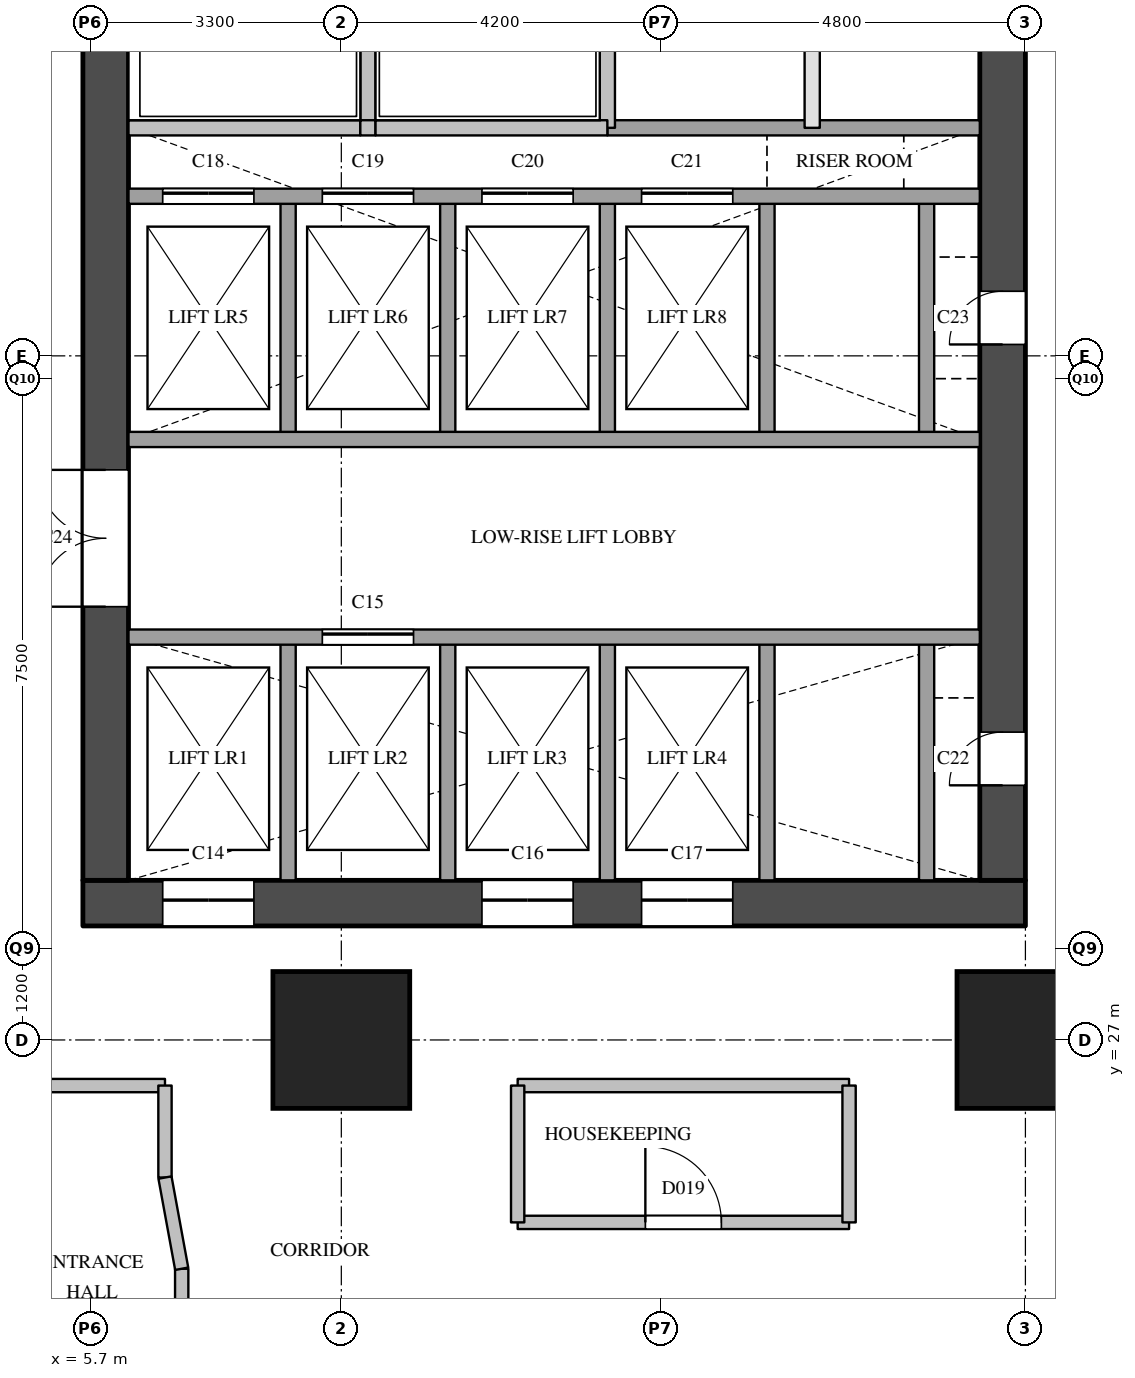
"""IFC4 building model, lengths in metres.
Left out: names, types, materials, properties, quantities, classifications, styles, units other than length and angle.
Written with IfcOpenShell. Run it as: python <this file> out.ifc"""

import sys

from ifc_helpers import new_model, si_unit, direction, frame, frame_2d, origin, origin_2d, place, context, subcontext, project, spatial, rectangle, extrude, element, fill, save


model = new_model("IFC4")
c1 = context("Model", 3, precision=1e-05, world=origin(), true_north=direction((0.0, 1.0)))
c2 = subcontext(c1, "Body", "Model", "MODEL_VIEW")
j1 = project(units=[si_unit("LENGTHUNIT", "METRE"), si_unit("PLANEANGLEUNIT", "RADIAN")], contexts=[c1])
p1 = place(None, origin())
s1 = spatial("IfcSite", under=j1, at=p1, CompositionType="ELEMENT")
p2 = place(p1, origin())
s2 = spatial("IfcBuilding", under=s1, at=p2, CompositionType="ELEMENT")
p3 = place(p2, frame((0.0, 0.0, 61.4)))
s3 = spatial("IfcBuildingStorey", under=s2, at=p3, CompositionType="ELEMENT", Elevation=61.4)
for number, where, z_axis, x_axis in (
    (1, (9.0, 27.0, 0.0), (0.0, 0.0, 1.0), (1.0, 0.0, 0.0)),
    (2, (18.0, 27.0, 0.0), (0.0, 0.0, 1.0), (1.0, 0.0, 0.0)),
):
    element("IfcColumn", number, at=place(p3, frame(where, z_axis=z_axis, x_axis=x_axis)), inside=s3, PredefinedType="COLUMN", context=c2, shape_type="SweptSolid", body=[
        extrude(rectangle(XDim=1.8, YDim=1.8, at=origin_2d()), origin(), (0.0, 0.0, 1.0), 3.8),
    ])
p4 = place(p3, frame((5.6, 28.8, 0.0), z_axis=(0.0, 0.0, 1.0), x_axis=(1.0, 0.0, 0.0)))
e3 = element("IfcWall", 3, at=p4, inside=s3, PredefinedType="SHEAR", context=c2, shape_type="SweptSolid", body=[
    extrude(rectangle(XDim=12.4, YDim=0.6, at=frame_2d((6.2, 0.0))), origin(), (0.0, 0.0, 1.0), 3.5),
])
p5 = place(p4, frame((1.05, 0.0, 0.0)))
e4 = element("IfcOpeningElement", 4, at=p5, cuts=e3, PredefinedType="OPENING", context=c2, shape_type="SweptSolid", body=[
    extrude(rectangle(XDim=1.2, YDim=2.1, at=frame_2d((0.6, 1.05))), frame((0.0, 0.31, 0.0), z_axis=(0.0, -1.0, 0.0), x_axis=(1.0, 0.0, 0.0)), (0.0, 0.0, 1.0), 0.62),
])
p6 = place(p4, frame((5.25, 0.0, 0.0)))
e5 = element("IfcOpeningElement", 5, at=p6, cuts=e3, PredefinedType="OPENING", context=c2, shape_type="SweptSolid", body=[
    extrude(rectangle(XDim=1.2, YDim=2.1, at=frame_2d((0.6, 1.05))), frame((0.0, 0.31, 0.0), z_axis=(0.0, -1.0, 0.0), x_axis=(1.0, 0.0, 0.0)), (0.0, 0.0, 1.0), 0.62),
])
p7 = place(p4, frame((7.35, 0.0, 0.0)))
e6 = element("IfcOpeningElement", 6, at=p7, cuts=e3, PredefinedType="OPENING", context=c2, shape_type="SweptSolid", body=[
    extrude(rectangle(XDim=1.2, YDim=2.1, at=frame_2d((0.6, 1.05))), frame((0.0, 0.31, 0.0), z_axis=(0.0, -1.0, 0.0), x_axis=(1.0, 0.0, 0.0)), (0.0, 0.0, 1.0), 0.62),
])
p8 = place(p3, frame((5.9, 29.1, 0.0), z_axis=(0.0, 0.0, 1.0), x_axis=(0.0, 1.0, 0.0)))
e7 = element("IfcWall", 7, at=p8, inside=s3, PredefinedType="SHEAR", context=c2, shape_type="SweptSolid", body=[
    extrude(rectangle(XDim=20.3, YDim=0.6, at=frame_2d((10.15, 0.0))), origin(), (0.0, 0.0, 1.0), 3.5),
])
p9 = place(p8, frame((3.6, 0.0, 0.0)))
e8 = element("IfcOpeningElement", 8, at=p9, cuts=e7, PredefinedType="OPENING", context=c2, shape_type="SweptSolid", body=[
    extrude(rectangle(XDim=1.8, YDim=2.1, at=frame_2d((0.9, 1.05))), frame((0.0, 0.31, 0.0), z_axis=(0.0, -1.0, 0.0), x_axis=(1.0, 0.0, 0.0)), (0.0, 0.0, 1.0), 0.62),
])
p10 = place(p8, frame((16.4, 0.0, 0.0)))
e9 = element("IfcOpeningElement", 9, at=p10, cuts=e7, PredefinedType="OPENING", context=c2, shape_type="SweptSolid", body=[
    extrude(rectangle(XDim=1.0, YDim=2.1, at=frame_2d((0.5, 1.05))), frame((0.0, 0.31, 0.0), z_axis=(0.0, -1.0, 0.0), x_axis=(1.0, 0.0, 0.0)), (0.0, 0.0, 1.0), 0.62),
])
p11 = place(p3, frame((17.7, 29.1, 0.0), z_axis=(0.0, 0.0, 1.0), x_axis=(0.0, 1.0, 0.0)))
e10 = element("IfcWall", 10, at=p11, inside=s3, PredefinedType="SHEAR", context=c2, shape_type="SweptSolid", body=[
    extrude(rectangle(XDim=20.3, YDim=0.6, at=frame_2d((10.15, 0.0))), origin(), (0.0, 0.0, 1.0), 3.5),
])
p12 = place(p11, frame((1.25, 0.0, 0.0)))
e11 = element("IfcOpeningElement", 11, at=p12, cuts=e10, PredefinedType="OPENING", context=c2, shape_type="SweptSolid", body=[
    extrude(rectangle(XDim=0.7, YDim=2.1, at=frame_2d((0.35, 1.05))), frame((0.0, 0.31, 0.0), z_axis=(0.0, -1.0, 0.0), x_axis=(1.0, 0.0, 0.0)), (0.0, 0.0, 1.0), 0.62),
])
p13 = place(p11, frame((7.05, 0.0, 0.0)))
e12 = element("IfcOpeningElement", 12, at=p13, cuts=e10, PredefinedType="OPENING", context=c2, shape_type="SweptSolid", body=[
    extrude(rectangle(XDim=0.7, YDim=2.1, at=frame_2d((0.35, 1.05))), frame((0.0, 0.31, 0.0), z_axis=(0.0, -1.0, 0.0), x_axis=(1.0, 0.0, 0.0)), (0.0, 0.0, 1.0), 0.62),
])
p14 = place(p3, frame((8.3, 29.1, 0.0), z_axis=(0.0, 0.0, 1.0), x_axis=(0.0, 1.0, 0.0)))
e13 = element("IfcWall", 13, at=p14, inside=s3, PredefinedType="SOLIDWALL", context=c2, shape_type="SweptSolid", body=[
    extrude(rectangle(XDim=3.2, YDim=0.2, at=frame_2d((1.6, 0.0))), origin(), (0.0, 0.0, 1.0), 3.5),
])
p15 = place(p3, frame((8.3, 34.9, 0.0), z_axis=(0.0, 0.0, 1.0), x_axis=(0.0, 1.0, 0.0)))
e14 = element("IfcWall", 14, at=p15, inside=s3, PredefinedType="SOLIDWALL", context=c2, shape_type="SweptSolid", body=[
    extrude(rectangle(XDim=3.2, YDim=0.2, at=frame_2d((1.6, 0.0))), origin(), (0.0, 0.0, 1.0), 3.5),
])
p16 = place(p3, frame((9.35, 39.0, 0.0), z_axis=(0.0, 0.0, 1.0), x_axis=(0.0, 1.0, 0.0)))
e15 = element("IfcWall", 15, at=p16, inside=s3, PredefinedType="SOLIDWALL", context=c2, shape_type="SweptSolid", body=[
    extrude(rectangle(XDim=1.9, YDim=0.2, at=frame_2d((0.95, 0.0))), origin(), (0.0, 0.0, 1.0), 3.5),
])
p17 = place(p3, frame((10.4, 29.1, 0.0), z_axis=(0.0, 0.0, 1.0), x_axis=(0.0, 1.0, 0.0)))
e16 = element("IfcWall", 16, at=p17, inside=s3, PredefinedType="SOLIDWALL", context=c2, shape_type="SweptSolid", body=[
    extrude(rectangle(XDim=3.2, YDim=0.2, at=frame_2d((1.6, 0.0))), origin(), (0.0, 0.0, 1.0), 3.5),
])
p18 = place(p3, frame((10.4, 34.9, 0.0), z_axis=(0.0, 0.0, 1.0), x_axis=(0.0, 1.0, 0.0)))
e17 = element("IfcWall", 17, at=p18, inside=s3, PredefinedType="SOLIDWALL", context=c2, shape_type="SweptSolid", body=[
    extrude(rectangle(XDim=3.2, YDim=0.2, at=frame_2d((1.6, 0.0))), origin(), (0.0, 0.0, 1.0), 3.5),
])
p19 = place(p3, frame((12.5, 29.1, 0.0), z_axis=(0.0, 0.0, 1.0), x_axis=(0.0, 1.0, 0.0)))
e18 = element("IfcWall", 18, at=p19, inside=s3, PredefinedType="SOLIDWALL", context=c2, shape_type="SweptSolid", body=[
    extrude(rectangle(XDim=3.2, YDim=0.2, at=frame_2d((1.6, 0.0))), origin(), (0.0, 0.0, 1.0), 3.5),
])
p20 = place(p3, frame((12.5, 34.9, 0.0), z_axis=(0.0, 0.0, 1.0), x_axis=(0.0, 1.0, 0.0)))
e19 = element("IfcWall", 19, at=p20, inside=s3, PredefinedType="SOLIDWALL", context=c2, shape_type="SweptSolid", body=[
    extrude(rectangle(XDim=3.2, YDim=0.2, at=frame_2d((1.6, 0.0))), origin(), (0.0, 0.0, 1.0), 3.5),
])
p21 = place(p3, frame((12.5, 39.0, 0.0), z_axis=(0.0, 0.0, 1.0), x_axis=(0.0, 1.0, 0.0)))
e20 = element("IfcWall", 20, at=p21, inside=s3, PredefinedType="SOLIDWALL", context=c2, shape_type="SweptSolid", body=[
    extrude(rectangle(XDim=1.9, YDim=0.2, at=frame_2d((0.95, 0.0))), origin(), (0.0, 0.0, 1.0), 3.5),
])
p22 = place(p3, frame((14.6, 29.1, 0.0), z_axis=(0.0, 0.0, 1.0), x_axis=(0.0, 1.0, 0.0)))
e21 = element("IfcWall", 21, at=p22, inside=s3, PredefinedType="SOLIDWALL", context=c2, shape_type="SweptSolid", body=[
    extrude(rectangle(XDim=3.2, YDim=0.2, at=frame_2d((1.6, 0.0))), origin(), (0.0, 0.0, 1.0), 3.5),
])
p23 = place(p3, frame((14.6, 34.9, 0.0), z_axis=(0.0, 0.0, 1.0), x_axis=(0.0, 1.0, 0.0)))
e22 = element("IfcWall", 22, at=p23, inside=s3, PredefinedType="SOLIDWALL", context=c2, shape_type="SweptSolid", body=[
    extrude(rectangle(XDim=3.2, YDim=0.2, at=frame_2d((1.6, 0.0))), origin(), (0.0, 0.0, 1.0), 3.5),
])
p24 = place(p3, frame((15.195, 39.0, 0.0), z_axis=(0.0, 0.0, 1.0), x_axis=(0.0, 1.0, 0.0)))
e23 = element("IfcWall", 23, at=p24, inside=s3, PredefinedType="PARTITIONING", context=c2, shape_type="SweptSolid", body=[
    extrude(rectangle(XDim=6.2, YDim=0.2, at=frame_2d((3.1, 0.0))), origin(), (0.0, 0.0, 1.0), 3.5),
])
p25 = place(p3, frame((16.7, 29.1, 0.0), z_axis=(0.0, 0.0, 1.0), x_axis=(0.0, 1.0, 0.0)))
e24 = element("IfcWall", 24, at=p25, inside=s3, PredefinedType="SOLIDWALL", context=c2, shape_type="SweptSolid", body=[
    extrude(rectangle(XDim=3.2, YDim=0.2, at=frame_2d((1.6, 0.0))), origin(), (0.0, 0.0, 1.0), 3.5),
])
p26 = place(p3, frame((16.7, 34.9, 0.0), z_axis=(0.0, 0.0, 1.0), x_axis=(0.0, 1.0, 0.0)))
e25 = element("IfcWall", 25, at=p26, inside=s3, PredefinedType="SOLIDWALL", context=c2, shape_type="SweptSolid", body=[
    extrude(rectangle(XDim=3.2, YDim=0.2, at=frame_2d((1.6, 0.0))), origin(), (0.0, 0.0, 1.0), 3.5),
])
p27 = place(p3, frame((6.2, 32.3, 0.0), z_axis=(0.0, 0.0, 1.0), x_axis=(1.0, 0.0, 0.0)))
e26 = element("IfcWall", 26, at=p27, inside=s3, PredefinedType="SOLIDWALL", context=c2, shape_type="SweptSolid", body=[
    extrude(rectangle(XDim=11.2, YDim=0.2, at=frame_2d((5.6, 0.0))), origin(), (0.0, 0.0, 1.0), 3.5),
])
p28 = place(p27, frame((2.55, 0.0, 0.0)))
e27 = element("IfcOpeningElement", 27, at=p28, cuts=e26, PredefinedType="OPENING", context=c2, shape_type="SweptSolid", body=[
    extrude(rectangle(XDim=1.2, YDim=2.1, at=frame_2d((0.6, 1.05))), frame((0.0, 0.11, 0.0), z_axis=(0.0, -1.0, 0.0), x_axis=(1.0, 0.0, 0.0)), (0.0, 0.0, 1.0), 0.22),
])
p29 = place(p3, frame((6.2, 34.9, 0.0), z_axis=(0.0, 0.0, 1.0), x_axis=(1.0, 0.0, 0.0)))
e28 = element("IfcWall", 28, at=p29, inside=s3, PredefinedType="SOLIDWALL", context=c2, shape_type="SweptSolid", body=[
    extrude(rectangle(XDim=11.2, YDim=0.2, at=frame_2d((5.6, 0.0))), origin(), (0.0, 0.0, 1.0), 3.5),
])
p30 = place(p3, frame((6.2, 38.1, 0.0), z_axis=(0.0, 0.0, 1.0), x_axis=(1.0, 0.0, 0.0)))
e29 = element("IfcWall", 29, at=p30, inside=s3, PredefinedType="SOLIDWALL", context=c2, shape_type="SweptSolid", body=[
    extrude(rectangle(XDim=11.2, YDim=0.2, at=frame_2d((5.6, 0.0))), origin(), (0.0, 0.0, 1.0), 3.5),
])
p31 = place(p30, frame((0.45, 0.0, 0.0)))
e30 = element("IfcOpeningElement", 30, at=p31, cuts=e29, PredefinedType="OPENING", context=c2, shape_type="SweptSolid", body=[
    extrude(rectangle(XDim=1.2, YDim=2.1, at=frame_2d((0.6, 1.05))), frame((0.0, 0.11, 0.0), z_axis=(0.0, -1.0, 0.0), x_axis=(1.0, 0.0, 0.0)), (0.0, 0.0, 1.0), 0.22),
])
p32 = place(p30, frame((2.55, 0.0, 0.0)))
e31 = element("IfcOpeningElement", 31, at=p32, cuts=e29, PredefinedType="OPENING", context=c2, shape_type="SweptSolid", body=[
    extrude(rectangle(XDim=1.2, YDim=2.1, at=frame_2d((0.6, 1.05))), frame((0.0, 0.11, 0.0), z_axis=(0.0, -1.0, 0.0), x_axis=(1.0, 0.0, 0.0)), (0.0, 0.0, 1.0), 0.22),
])
p33 = place(p30, frame((4.65, 0.0, 0.0)))
e32 = element("IfcOpeningElement", 32, at=p33, cuts=e29, PredefinedType="OPENING", context=c2, shape_type="SweptSolid", body=[
    extrude(rectangle(XDim=1.2, YDim=2.1, at=frame_2d((0.6, 1.05))), frame((0.0, 0.11, 0.0), z_axis=(0.0, -1.0, 0.0), x_axis=(1.0, 0.0, 0.0)), (0.0, 0.0, 1.0), 0.22),
])
p34 = place(p30, frame((6.75, 0.0, 0.0)))
e33 = element("IfcOpeningElement", 33, at=p34, cuts=e29, PredefinedType="OPENING", context=c2, shape_type="SweptSolid", body=[
    extrude(rectangle(XDim=1.2, YDim=2.1, at=frame_2d((0.6, 1.05))), frame((0.0, 0.11, 0.0), z_axis=(0.0, -1.0, 0.0), x_axis=(1.0, 0.0, 0.0)), (0.0, 0.0, 1.0), 0.22),
])
p35 = place(p3, frame((12.5, 39.0, 0.0), z_axis=(0.0, 0.0, 1.0), x_axis=(1.0, 0.0, 0.0)))
e34 = element("IfcWall", 34, at=p35, inside=s3, PredefinedType="SOLIDWALL", context=c2, shape_type="SweptSolid", body=[
    extrude(rectangle(XDim=4.9, YDim=0.2, at=frame_2d((2.45, 0.0))), origin(), (0.0, 0.0, 1.0), 3.5),
])
p36 = place(p3, frame((6.2, 39.0, 0.0), z_axis=(0.0, 0.0, 1.0), x_axis=(1.0, 0.0, 0.0)))
e35 = element("IfcWall", 35, at=p36, inside=s3, PredefinedType="SOLIDWALL", context=c2, shape_type="SweptSolid", body=[
    extrude(rectangle(XDim=3.05, YDim=0.2, at=frame_2d((1.525, 0.0))), origin(), (0.0, 0.0, 1.0), 3.5),
])
p37 = place(p3, frame((9.25, 39.0, 0.0), z_axis=(0.0, 0.0, 1.0), x_axis=(1.0, 0.0, 0.0)))
e36 = element("IfcWall", 36, at=p37, inside=s3, PredefinedType="SOLIDWALL", context=c2, shape_type="SweptSolid", body=[
    extrude(rectangle(XDim=0.2, YDim=0.2, at=frame_2d((0.1, 0.0))), origin(), (0.0, 0.0, 1.0), 3.5),
])
p38 = place(p3, frame((9.45, 39.0, 0.0), z_axis=(0.0, 0.0, 1.0), x_axis=(1.0, 0.0, 0.0)))
e37 = element("IfcWall", 37, at=p38, inside=s3, PredefinedType="SOLIDWALL", context=c2, shape_type="SweptSolid", body=[
    extrude(rectangle(XDim=3.05, YDim=0.2, at=frame_2d((1.525, 0.0))), origin(), (0.0, 0.0, 1.0), 3.5),
])
p39 = place(p3, frame((11.32, 24.6, 0.0), z_axis=(0.0, 0.0, 1.0), x_axis=(1.0, 0.0, 0.0)))
e38 = element("IfcWall", 38, at=p39, inside=s3, PredefinedType="PARTITIONING", context=c2, shape_type="SweptSolid", body=[
    extrude(rectangle(XDim=4.36, YDim=0.175, at=frame_2d((2.18, 0.0))), origin(), (0.0, 0.0, 1.0), 3.5),
])
p40 = place(p39, frame((1.68, 0.0, 0.0)))
e39 = element("IfcOpeningElement", 39, at=p40, cuts=e38, PredefinedType="OPENING", context=c2, shape_type="SweptSolid", body=[
    extrude(rectangle(XDim=1.0, YDim=2.1, at=frame_2d((0.5, 1.05))), frame((0.0, 0.097, 0.0), z_axis=(0.0, -1.0, 0.0), x_axis=(1.0, 0.0, 0.0)), (0.0, 0.0, 1.0), 0.195),
])
p41 = place(p3, frame((3.5, 26.4, 0.0), z_axis=(0.0, 0.0, 1.0), x_axis=(1.0, 0.0, 0.0)))
e40 = element("IfcWall", 40, at=p41, inside=s3, PredefinedType="PARTITIONING", context=c2, shape_type="SweptSolid", body=[
    extrude(rectangle(XDim=3.18, YDim=0.175, at=frame_2d((1.59, 0.0))), origin(), (0.0, 0.0, 1.0), 3.5),
])
p42 = place(p3, frame((11.32, 26.4, 0.0), z_axis=(0.0, 0.0, 1.0), x_axis=(1.0, 0.0, 0.0)))
e41 = element("IfcWall", 41, at=p42, inside=s3, PredefinedType="PARTITIONING", context=c2, shape_type="SweptSolid", body=[
    extrude(rectangle(XDim=4.36, YDim=0.175, at=frame_2d((2.18, 0.0))), origin(), (0.0, 0.0, 1.0), 3.5),
])
p43 = place(p3, frame((6.68, 25.19, 0.0), z_axis=(0.0, 0.0, 1.0), x_axis=(0.0, 1.0, 0.0)))
e42 = element("IfcWall", 42, at=p43, inside=s3, PredefinedType="PARTITIONING", context=c2, shape_type="SweptSolid", body=[
    extrude(rectangle(XDim=1.21, YDim=0.175, at=frame_2d((0.605, 0.0))), origin(), (0.0, 0.0, 1.0), 3.5),
])
p44 = place(p3, frame((6.9, 6.9, 0.0), z_axis=(0.0, 0.0, 1.0), x_axis=(0.0, 1.0, 0.0)))
e43 = element("IfcWall", 43, at=p44, inside=s3, PredefinedType="PARTITIONING", context=c2, shape_type="SweptSolid", body=[
    extrude(rectangle(XDim=17.09, YDim=0.175, at=frame_2d((8.545, 0.0))), origin(), (0.0, 0.0, 1.0), 3.5),
])
p45 = place(p44, frame((7.3, 0.0, 0.0)))
e44 = element("IfcOpeningElement", 44, at=p45, cuts=e43, PredefinedType="OPENING", context=c2, shape_type="SweptSolid", body=[
    extrude(rectangle(XDim=1.0, YDim=2.1, at=frame_2d((0.5, 1.05))), frame((0.0, 0.097, 0.0), z_axis=(0.0, -1.0, 0.0), x_axis=(1.0, 0.0, 0.0)), (0.0, 0.0, 1.0), 0.195),
])
p46 = place(p44, frame((13.895, 0.0, 0.0)))
e45 = element("IfcOpeningElement", 45, at=p46, cuts=e43, PredefinedType="OPENING", context=c2, shape_type="SweptSolid", body=[
    extrude(rectangle(XDim=1.0, YDim=2.1, at=frame_2d((0.5, 1.05))), frame((0.0, 0.097, 0.0), z_axis=(0.0, -1.0, 0.0), x_axis=(1.0, 0.0, 0.0)), (0.0, 0.0, 1.0), 0.195),
])
for number, where, z_axis, x_axis in (
    (46, (11.32, 24.6, 0.0), (0.0, 0.0, 1.0), (0.0, 1.0, 0.0)),
    (47, (15.68, 24.6, 0.0), (0.0, 0.0, 1.0), (0.0, 1.0, 0.0)),
):
    element("IfcWall", number, at=place(p3, frame(where, z_axis=z_axis, x_axis=x_axis)), inside=s3, PredefinedType="PARTITIONING", context=c2, shape_type="SweptSolid", body=[
        extrude(rectangle(XDim=1.8, YDim=0.175, at=frame_2d((0.9, 0.0))), origin(), (0.0, 0.0, 1.0), 3.5),
    ])
p47 = place(p3, frame((6.9, 23.99, 0.0), z_axis=(0.0, 0.0, 1.0), x_axis=(-0.180311734132, 0.983609515272, 0.0)))
e48 = element("IfcWall", 48, at=p47, inside=s3, PredefinedType="PARTITIONING", context=c2, shape_type="SweptSolid", body=[
    extrude(rectangle(XDim=1.22, YDim=0.175, at=frame_2d((0.61, 0.0))), origin(), (0.0, 0.0, 1.0), 3.5),
])
p48 = place(p5, origin())
e49 = element("IfcDoor", 49, at=p48, inside=s3, OperationType="SLIDING_TO_LEFT", PredefinedType="DOOR", context=c2, shape_type="SweptSolid", body=[
    extrude(rectangle(XDim=1.2, YDim=2.1, at=frame_2d((0.6, 1.05))), frame((0.0, 0.025, 0.0), z_axis=(0.0, -1.0, 0.0), x_axis=(1.0, 0.0, 0.0)), (0.0, 0.0, 1.0), 0.05),
])
fill(e4, e49)
p49 = place(p28, origin())
e50 = element("IfcDoor", 50, at=p49, inside=s3, OperationType="SLIDING_TO_LEFT", PredefinedType="DOOR", context=c2, shape_type="SweptSolid", body=[
    extrude(rectangle(XDim=1.2, YDim=2.1, at=frame_2d((0.6, 1.05))), frame((0.0, 0.025, 0.0), z_axis=(0.0, -1.0, 0.0), x_axis=(1.0, 0.0, 0.0)), (0.0, 0.0, 1.0), 0.05),
])
fill(e27, e50)
p50 = place(p6, origin())
e51 = element("IfcDoor", 51, at=p50, inside=s3, OperationType="SLIDING_TO_LEFT", PredefinedType="DOOR", context=c2, shape_type="SweptSolid", body=[
    extrude(rectangle(XDim=1.2, YDim=2.1, at=frame_2d((0.6, 1.05))), frame((0.0, 0.025, 0.0), z_axis=(0.0, -1.0, 0.0), x_axis=(1.0, 0.0, 0.0)), (0.0, 0.0, 1.0), 0.05),
])
fill(e5, e51)
p51 = place(p7, origin())
e52 = element("IfcDoor", 52, at=p51, inside=s3, OperationType="SLIDING_TO_LEFT", PredefinedType="DOOR", context=c2, shape_type="SweptSolid", body=[
    extrude(rectangle(XDim=1.2, YDim=2.1, at=frame_2d((0.6, 1.05))), frame((0.0, 0.025, 0.0), z_axis=(0.0, -1.0, 0.0), x_axis=(1.0, 0.0, 0.0)), (0.0, 0.0, 1.0), 0.05),
])
fill(e6, e52)
p52 = place(p31, origin())
e53 = element("IfcDoor", 53, at=p52, inside=s3, OperationType="SLIDING_TO_LEFT", PredefinedType="DOOR", context=c2, shape_type="SweptSolid", body=[
    extrude(rectangle(XDim=1.2, YDim=2.1, at=frame_2d((0.6, 1.05))), frame((0.0, 0.025, 0.0), z_axis=(0.0, -1.0, 0.0), x_axis=(1.0, 0.0, 0.0)), (0.0, 0.0, 1.0), 0.05),
])
fill(e30, e53)
p53 = place(p32, origin())
e54 = element("IfcDoor", 54, at=p53, inside=s3, OperationType="SLIDING_TO_LEFT", PredefinedType="DOOR", context=c2, shape_type="SweptSolid", body=[
    extrude(rectangle(XDim=1.2, YDim=2.1, at=frame_2d((0.6, 1.05))), frame((0.0, 0.025, 0.0), z_axis=(0.0, -1.0, 0.0), x_axis=(1.0, 0.0, 0.0)), (0.0, 0.0, 1.0), 0.05),
])
fill(e31, e54)
p54 = place(p33, origin())
e55 = element("IfcDoor", 55, at=p54, inside=s3, OperationType="SLIDING_TO_LEFT", PredefinedType="DOOR", context=c2, shape_type="SweptSolid", body=[
    extrude(rectangle(XDim=1.2, YDim=2.1, at=frame_2d((0.6, 1.05))), frame((0.0, 0.025, 0.0), z_axis=(0.0, -1.0, 0.0), x_axis=(1.0, 0.0, 0.0)), (0.0, 0.0, 1.0), 0.05),
])
fill(e32, e55)
p55 = place(p34, origin())
e56 = element("IfcDoor", 56, at=p55, inside=s3, OperationType="SLIDING_TO_LEFT", PredefinedType="DOOR", context=c2, shape_type="SweptSolid", body=[
    extrude(rectangle(XDim=1.2, YDim=2.1, at=frame_2d((0.6, 1.05))), frame((0.0, 0.025, 0.0), z_axis=(0.0, -1.0, 0.0), x_axis=(1.0, 0.0, 0.0)), (0.0, 0.0, 1.0), 0.05),
])
fill(e33, e56)
p56 = place(p12, origin())
e57 = element("IfcDoor", 57, at=p56, inside=s3, OperationType="SINGLE_SWING_LEFT", PredefinedType="DOOR", context=c2, shape_type="SweptSolid", body=[
    extrude(rectangle(XDim=0.7, YDim=2.1, at=frame_2d((0.35, 1.05))), frame((0.0, 0.025, 0.0), z_axis=(0.0, -1.0, 0.0), x_axis=(1.0, 0.0, 0.0)), (0.0, 0.0, 1.0), 0.05),
])
fill(e11, e57)
p57 = place(p13, origin())
e58 = element("IfcDoor", 58, at=p57, inside=s3, OperationType="SINGLE_SWING_LEFT", PredefinedType="DOOR", context=c2, shape_type="SweptSolid", body=[
    extrude(rectangle(XDim=0.7, YDim=2.1, at=frame_2d((0.35, 1.05))), frame((0.0, 0.025, 0.0), z_axis=(0.0, -1.0, 0.0), x_axis=(1.0, 0.0, 0.0)), (0.0, 0.0, 1.0), 0.05),
])
fill(e12, e58)
p58 = place(p9, origin())
e59 = element("IfcDoor", 59, at=p58, inside=s3, OperationType="DOUBLE_DOOR_SINGLE_SWING", PredefinedType="DOOR", context=c2, shape_type="SweptSolid", body=[
    extrude(rectangle(XDim=1.8, YDim=2.1, at=frame_2d((0.9, 1.05))), frame((0.0, 0.025, 0.0), z_axis=(0.0, -1.0, 0.0), x_axis=(1.0, 0.0, 0.0)), (0.0, 0.0, 1.0), 0.05),
])
fill(e8, e59)
p59 = place(p40, origin())
e60 = element("IfcDoor", 60, at=p59, inside=s3, OperationType="SINGLE_SWING_LEFT", PredefinedType="DOOR", context=c2, shape_type="SweptSolid", body=[
    extrude(rectangle(XDim=1.0, YDim=2.1, at=frame_2d((0.5, 1.05))), frame((0.0, 0.025, 0.0), z_axis=(0.0, -1.0, 0.0), x_axis=(1.0, 0.0, 0.0)), (0.0, 0.0, 1.0), 0.05),
])
fill(e39, e60)
save(model, sys.argv[1])
